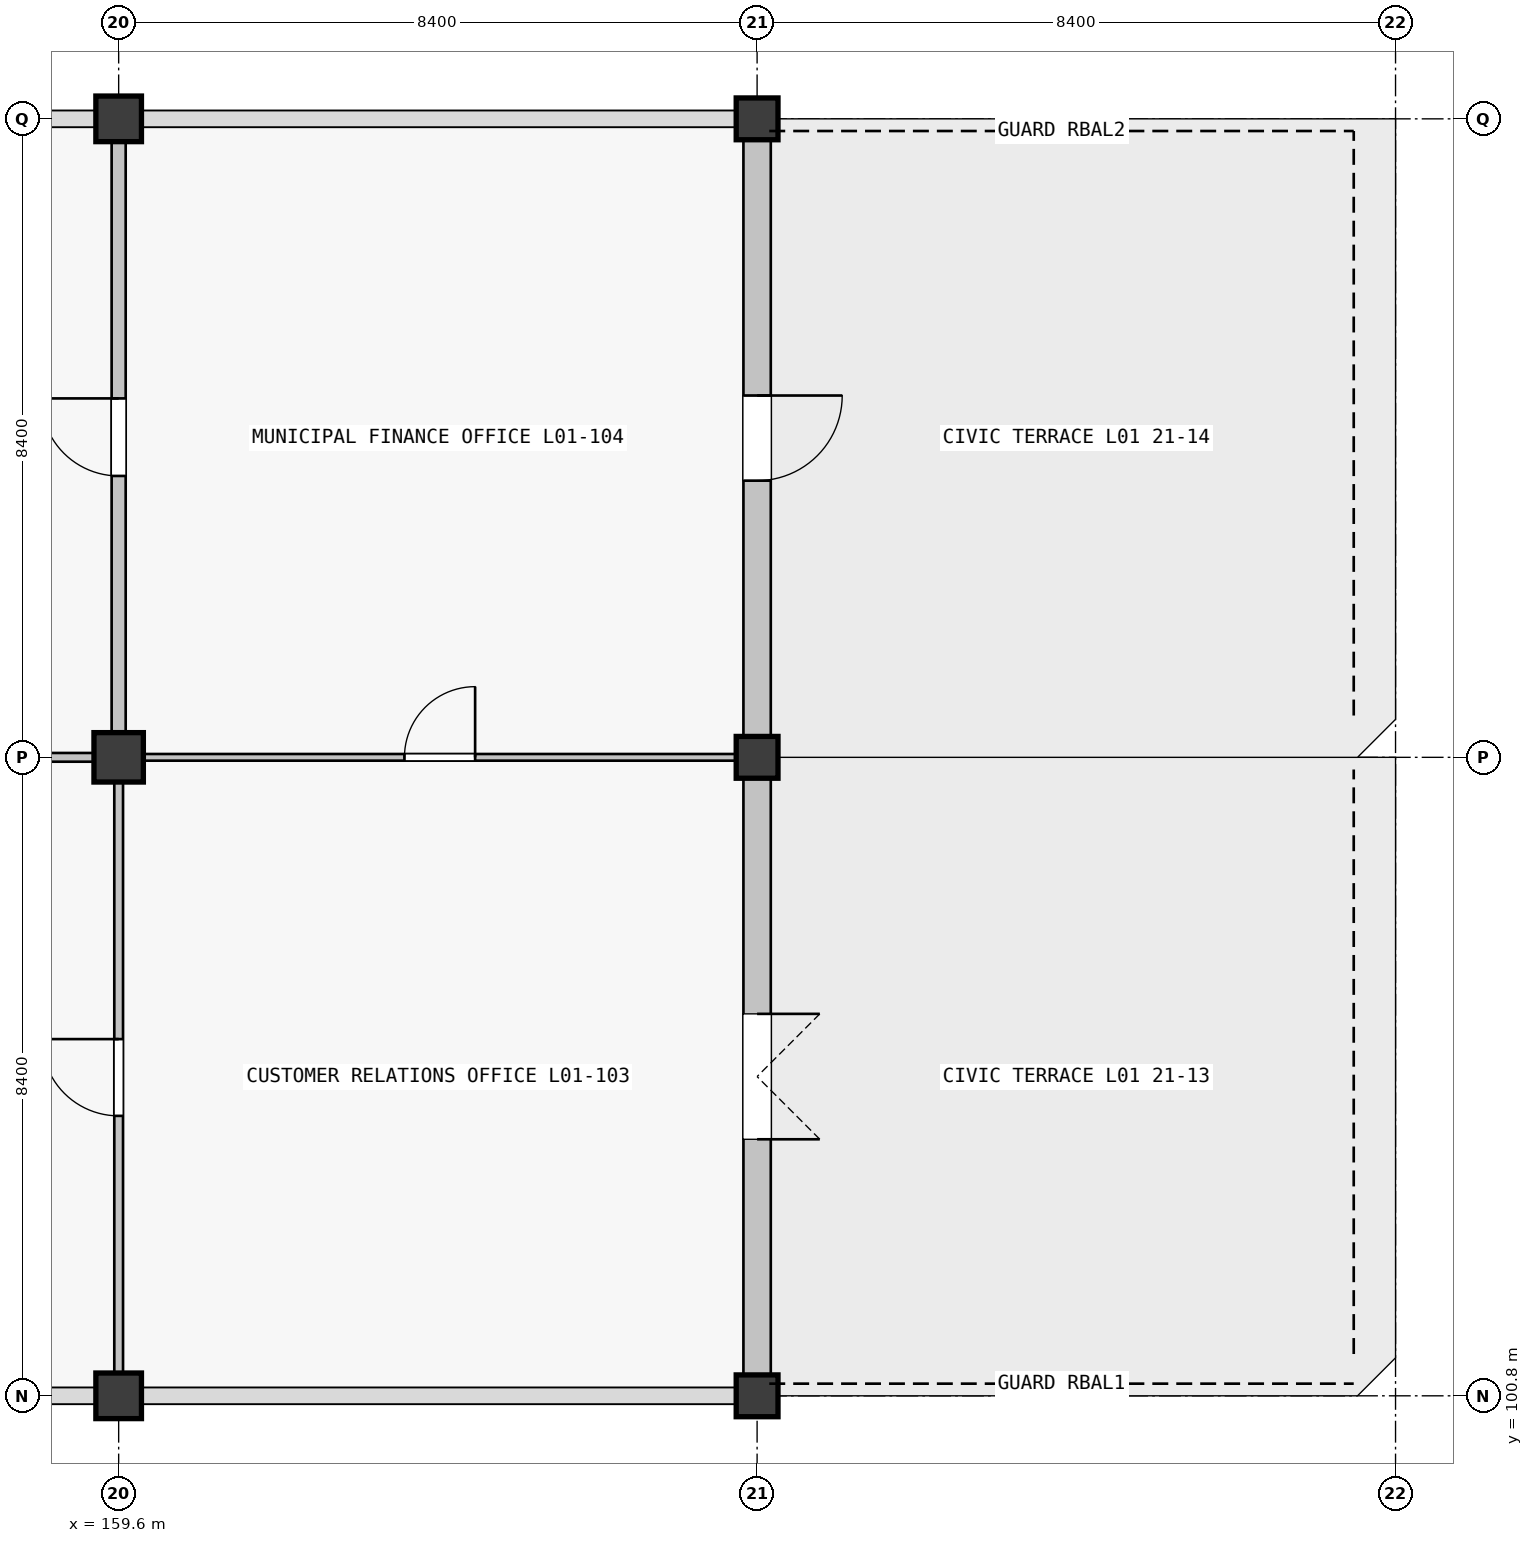
"""IFC4 building model, lengths in metres.
Left out: names, types, materials, properties, quantities, classifications, styles, units other than length and angle.
Written with IfcOpenShell. Run it as: python <this file> out.ifc"""

import sys

from ifc_helpers import new_model, si_unit, direction, frame, frame_2d, origin, origin_2d, place, context, subcontext, project, spatial, rectangle, extrude, element, fill, save


model = new_model("IFC4")
c1 = context("Model", 3, precision=1e-05, world=origin(), true_north=direction((0.0, 1.0)))
c2 = subcontext(c1, "Body", "Model", "MODEL_VIEW")
j1 = project(units=[si_unit("LENGTHUNIT", "METRE"), si_unit("PLANEANGLEUNIT", "RADIAN")], contexts=[c1])
p1 = place(None, origin())
s1 = spatial("IfcSite", under=j1, at=p1, CompositionType="ELEMENT")
p2 = place(p1, origin())
s2 = spatial("IfcBuilding", under=s1, at=p2, CompositionType="ELEMENT")
p3 = place(p2, frame((0.0, 0.0, 5.76)))
s3 = spatial("IfcBuildingStorey", under=s2, at=p3, CompositionType="ELEMENT", Elevation=5.76)
p4 = place(p3, frame((159.6, 100.8, 0.0), z_axis=(0.0, 0.0, 1.0), x_axis=(1.0, 0.0, 0.0)))
e1 = element("IfcColumn", 1, at=p4, inside=s3, PredefinedType="COLUMN", context=c2, shape_type="SweptSolid", body=[
    extrude(rectangle(XDim=0.6, YDim=0.6, at=origin_2d()), origin(), (0.0, 0.0, 1.0), 4.5),
])
p5 = place(p3, frame((159.6, 109.2, 0.0), z_axis=(0.0, 0.0, 1.0), x_axis=(1.0, 0.0, 0.0)))
e2 = element("IfcColumn", 2, at=p5, inside=s3, PredefinedType="COLUMN", context=c2, shape_type="SweptSolid", body=[
    extrude(rectangle(XDim=0.65, YDim=0.65, at=origin_2d()), origin(), (0.0, 0.0, 1.0), 4.5),
])
p6 = place(p3, frame((159.6, 117.6, 0.0), z_axis=(0.0, 0.0, 1.0), x_axis=(1.0, 0.0, 0.0)))
e3 = element("IfcColumn", 3, at=p6, inside=s3, PredefinedType="COLUMN", context=c2, shape_type="SweptSolid", body=[
    extrude(rectangle(XDim=0.6, YDim=0.6, at=origin_2d()), origin(), (0.0, 0.0, 1.0), 4.5),
])
for number, where, z_axis, x_axis in (
    (4, (168.0, 100.8, 0.0), (0.0, 0.0, 1.0), (1.0, 0.0, 0.0)),
    (5, (168.0, 109.2, 0.0), (0.0, 0.0, 1.0), (1.0, 0.0, 0.0)),
    (6, (168.0, 117.6, 0.0), (0.0, 0.0, 1.0), (1.0, 0.0, 0.0)),
):
    element("IfcColumn", number, at=place(p3, frame(where, z_axis=z_axis, x_axis=x_axis)), inside=s3, PredefinedType="COLUMN", context=c2, shape_type="SweptSolid", body=[
        extrude(rectangle(XDim=0.55, YDim=0.55, at=origin_2d()), origin(), (0.0, 0.0, 1.0), 4.2),
    ])
p7 = place(p3, frame((168.0, 108.924, 0.0), z_axis=(0.0, 0.0, 1.0), x_axis=(0.0, -1.0, 0.0)))
e7 = element("IfcWall", 7, at=p7, inside=s3, PredefinedType="SOLIDWALL", context=c2, shape_type="SweptSolid", body=[
    extrude(rectangle(XDim=7.848, YDim=0.36, at=frame_2d((3.924, 0.0))), origin(), (0.0, 0.0, 1.0), 3.4),
])
p8 = place(p7, frame((3.099, 0.0, 0.0)))
e8 = element("IfcOpeningElement", 8, at=p8, cuts=e7, PredefinedType="OPENING", context=c2, shape_type="SweptSolid", body=[
    extrude(rectangle(XDim=1.65, YDim=2.2, at=frame_2d((0.825, 1.1))), frame((0.0, 0.18, 0.0), z_axis=(0.0, -1.0, 0.0), x_axis=(1.0, 0.0, 0.0)), (0.0, 0.0, 1.0), 0.36),
])
p9 = place(p3, frame((168.0, 117.324, 0.0), z_axis=(0.0, 0.0, 1.0), x_axis=(0.0, -1.0, 0.0)))
e9 = element("IfcWall", 9, at=p9, inside=s3, PredefinedType="SOLIDWALL", context=c2, shape_type="SweptSolid", body=[
    extrude(rectangle(XDim=7.848, YDim=0.36, at=frame_2d((3.924, 0.0))), origin(), (0.0, 0.0, 1.0), 3.4),
])
p10 = place(p9, frame((3.364, 0.0, 0.0)))
e10 = element("IfcOpeningElement", 10, at=p10, cuts=e9, PredefinedType="OPENING", context=c2, shape_type="SweptSolid", body=[
    extrude(rectangle(XDim=1.12, YDim=2.2, at=frame_2d((0.56, 1.1))), frame((0.0, 0.18, 0.0), z_axis=(0.0, -1.0, 0.0), x_axis=(1.0, 0.0, 0.0)), (0.0, 0.0, 1.0), 0.36),
])
p11 = place(p3, frame((151.552, 109.2, 0.0), z_axis=(0.0, 0.0, 1.0), x_axis=(1.0, 0.0, 0.0)))
e11 = element("IfcWall", 11, at=p11, inside=s3, PredefinedType="PARTITIONING", context=c2, shape_type="SweptSolid", body=[
    extrude(rectangle(XDim=7.721, YDim=0.115, at=frame_2d((3.86, 0.0))), origin(), (0.0, 0.0, 1.0), 2.4),
])
p12 = place(p11, frame((3.336, 0.0, 0.0)))
e12 = element("IfcOpeningElement", 12, at=p12, cuts=e11, PredefinedType="OPENING", context=c2, shape_type="SweptSolid", body=[
    extrude(rectangle(XDim=1.05, YDim=2.12, at=frame_2d((0.525, 1.06))), frame((0.0, 0.058, 0.0), z_axis=(0.0, -1.0, 0.0), x_axis=(1.0, 0.0, 0.0)), (0.0, 0.0, 1.0), 0.115),
])
p13 = place(p3, frame((159.927, 109.2, 0.0), z_axis=(0.0, 0.0, 1.0), x_axis=(1.0, 0.0, 0.0)))
e13 = element("IfcWall", 13, at=p13, inside=s3, PredefinedType="PARTITIONING", context=c2, shape_type="SweptSolid", body=[
    extrude(rectangle(XDim=7.796, YDim=0.088, at=frame_2d((3.898, 0.0))), origin(), (0.0, 0.0, 1.0), 2.4),
])
p14 = place(p13, frame((3.433, 0.0, 0.0)))
e14 = element("IfcOpeningElement", 14, at=p14, cuts=e13, PredefinedType="OPENING", context=c2, shape_type="SweptSolid", body=[
    extrude(rectangle(XDim=0.93, YDim=2.12, at=frame_2d((0.465, 1.06))), frame((0.0, 0.044, 0.0), z_axis=(0.0, -1.0, 0.0), x_axis=(1.0, 0.0, 0.0)), (0.0, 0.0, 1.0), 0.088),
])
p15 = place(p3, frame((159.6, 101.102, 0.0), z_axis=(0.0, 0.0, 1.0), x_axis=(0.0, 1.0, 0.0)))
e15 = element("IfcWall", 15, at=p15, inside=s3, PredefinedType="PARTITIONING", context=c2, shape_type="SweptSolid", body=[
    extrude(rectangle(XDim=7.771, YDim=0.115, at=frame_2d((3.885, 0.0))), origin(), (0.0, 0.0, 1.0), 2.4),
])
p16 = place(p15, frame((3.381, 0.0, 0.0)))
e16 = element("IfcOpeningElement", 16, at=p16, cuts=e15, PredefinedType="OPENING", context=c2, shape_type="SweptSolid", body=[
    extrude(rectangle(XDim=1.01, YDim=2.12, at=frame_2d((0.505, 1.06))), frame((0.0, 0.058, 0.0), z_axis=(0.0, -1.0, 0.0), x_axis=(1.0, 0.0, 0.0)), (0.0, 0.0, 1.0), 0.115),
])
p17 = place(p3, frame((159.6, 109.527, 0.0), z_axis=(0.0, 0.0, 1.0), x_axis=(0.0, 1.0, 0.0)))
e17 = element("IfcWall", 17, at=p17, inside=s3, PredefinedType="PARTITIONING", context=c2, shape_type="SweptSolid", body=[
    extrude(rectangle(XDim=7.771, YDim=0.185, at=frame_2d((3.885, 0.0))), origin(), (0.0, 0.0, 1.0), 2.4),
])
p18 = place(p17, frame((3.375, 0.0, 0.0)))
e18 = element("IfcOpeningElement", 18, at=p18, cuts=e17, PredefinedType="OPENING", context=c2, shape_type="SweptSolid", body=[
    extrude(rectangle(XDim=1.02, YDim=2.2, at=frame_2d((0.51, 1.1))), frame((0.0, 0.093, 0.0), z_axis=(0.0, -1.0, 0.0), x_axis=(1.0, 0.0, 0.0)), (0.0, 0.0, 1.0), 0.185),
])
p19 = place(p8, origin())
e19 = element("IfcDoor", 19, at=p19, inside=s3, OperationType="DOUBLE_DOOR_SINGLE_SWING", PredefinedType="DOOR", context=c2, shape_type="SweptSolid", body=[
    extrude(rectangle(XDim=1.65, YDim=2.2, at=frame_2d((0.825, 1.1))), frame((0.0, 0.025, 0.0), z_axis=(0.0, -1.0, 0.0), x_axis=(1.0, 0.0, 0.0)), (0.0, 0.0, 1.0), 0.05),
])
fill(e8, e19)
p20 = place(p10, origin())
e20 = element("IfcDoor", 20, at=p20, inside=s3, OperationType="SINGLE_SWING_LEFT", PredefinedType="DOOR", context=c2, shape_type="SweptSolid", body=[
    extrude(rectangle(XDim=1.12, YDim=2.2, at=frame_2d((0.56, 1.1))), frame((0.0, 0.025, 0.0), z_axis=(0.0, -1.0, 0.0), x_axis=(1.0, 0.0, 0.0)), (0.0, 0.0, 1.0), 0.05),
])
fill(e10, e20)
p21 = place(p16, origin())
e21 = element("IfcDoor", 21, at=p21, inside=s3, OperationType="SINGLE_SWING_RIGHT", PredefinedType="DOOR", context=c2, shape_type="SweptSolid", body=[
    extrude(rectangle(XDim=1.01, YDim=2.12, at=frame_2d((0.505, 1.06))), frame((0.0, 0.025, 0.0), z_axis=(0.0, -1.0, 0.0), x_axis=(1.0, 0.0, 0.0)), (0.0, 0.0, 1.0), 0.05),
])
fill(e16, e21)
p22 = place(p14, origin())
e22 = element("IfcDoor", 22, at=p22, inside=s3, OperationType="SINGLE_SWING_RIGHT", PredefinedType="DOOR", context=c2, shape_type="SweptSolid", body=[
    extrude(rectangle(XDim=0.93, YDim=2.12, at=frame_2d((0.465, 1.06))), frame((0.0, 0.025, 0.0), z_axis=(0.0, -1.0, 0.0), x_axis=(1.0, 0.0, 0.0)), (0.0, 0.0, 1.0), 0.05),
])
fill(e14, e22)
p23 = place(p18, origin())
e23 = element("IfcDoor", 23, at=p23, inside=s3, OperationType="SINGLE_SWING_RIGHT", PredefinedType="DOOR", context=c2, shape_type="SweptSolid", body=[
    extrude(rectangle(XDim=1.02, YDim=2.2, at=frame_2d((0.51, 1.1))), frame((0.0, 0.025, 0.0), z_axis=(0.0, -1.0, 0.0), x_axis=(1.0, 0.0, 0.0)), (0.0, 0.0, 1.0), 0.05),
])
fill(e18, e23)
save(model, sys.argv[1])
